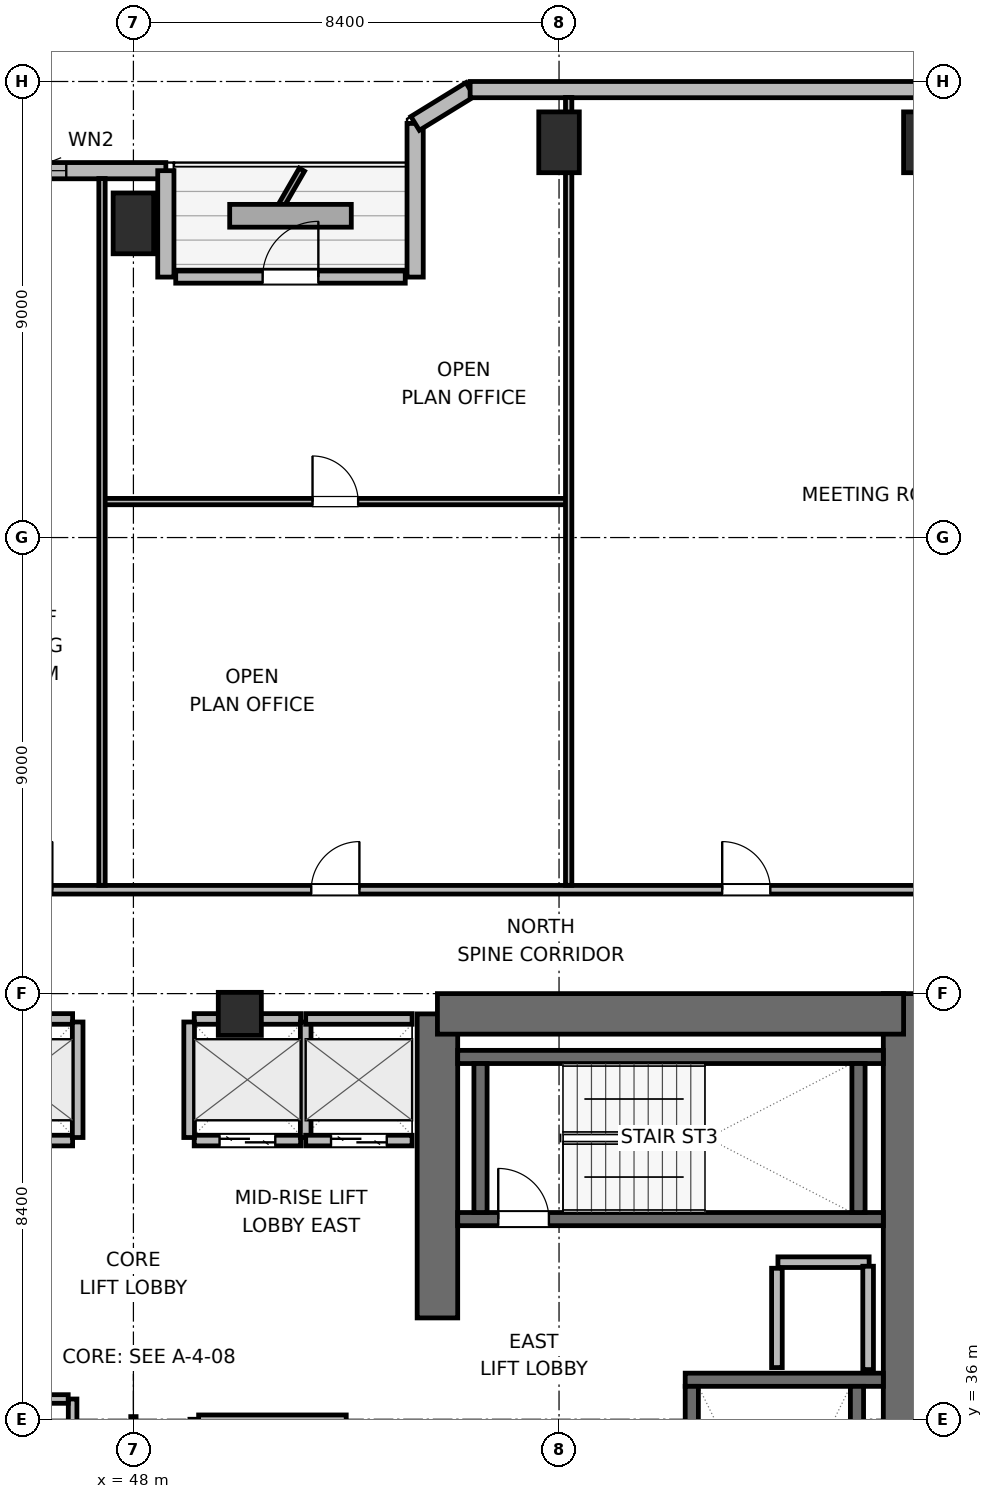
"""IFC4 building model, lengths in metres.
Left out: names, types, materials, properties, quantities, classifications, styles, units other than length and angle.
Written with IfcOpenShell. Run it as: python <this file> out.ifc"""

import sys

from ifc_helpers import new_model, si_unit, direction, frame, frame_2d, origin, origin_2d, place, context, subcontext, project, spatial, rectangle, extrude, element, fill, save


model = new_model("IFC4")
c1 = context("Model", 3, precision=1e-05, world=origin(), true_north=direction((0.0, 1.0)))
c2 = subcontext(c1, "Body", "Model", "MODEL_VIEW")
j1 = project(units=[si_unit("LENGTHUNIT", "METRE"), si_unit("PLANEANGLEUNIT", "RADIAN")], contexts=[c1])
p1 = place(None, origin())
s1 = spatial("IfcSite", under=j1, at=p1, CompositionType="ELEMENT")
p2 = place(p1, origin())
s2 = spatial("IfcBuilding", under=s1, at=p2, CompositionType="ELEMENT")
p3 = place(p2, frame((0.0, 0.0, 133.8)))
s3 = spatial("IfcBuildingStorey", under=s2, at=p3, CompositionType="ELEMENT", Elevation=133.8)
p4 = place(p3, frame((54.0, 38.0, 0.0), z_axis=(0.0, 0.0, 1.0), x_axis=(0.0, 1.0, 0.0)))
e1 = element("IfcWall", 1, at=p4, inside=s3, PredefinedType="SHEAR", context=c2, shape_type="SweptSolid", body=[
    extrude(rectangle(XDim=6.0, YDim=0.8, at=frame_2d((3.0, 0.0))), origin(), (0.0, 0.0, 1.0), 3.9),
])
p5 = place(p3, frame((63.2, 27.6, 0.0), z_axis=(0.0, 0.0, 1.0), x_axis=(0.0, 1.0, 0.0)))
e2 = element("IfcWall", 2, at=p5, inside=s3, PredefinedType="SHEAR", context=c2, shape_type="SweptSolid", body=[
    extrude(rectangle(XDim=16.8, YDim=0.8, at=frame_2d((8.4, 0.0))), origin(), (0.0, 0.0, 1.0), 3.9),
])
p6 = place(p3, frame((54.0, 44.0, 0.0), z_axis=(0.0, 0.0, 1.0), x_axis=(1.0, 0.0, 0.0)))
e3 = element("IfcWall", 3, at=p6, inside=s3, PredefinedType="SHEAR", context=c2, shape_type="SweptSolid", body=[
    extrude(rectangle(XDim=9.2, YDim=0.8, at=frame_2d((4.6, 0.0))), origin(), (0.0, 0.0, 1.0), 3.9),
])
p7 = place(p3, frame((58.89, 36.78, 0.0), z_axis=(0.0, 0.0, 1.0), x_axis=(1.0, 0.0, 0.0)))
e4 = element("IfcWall", 4, at=p7, inside=s3, PredefinedType="SHEAR", context=c2, shape_type="SweptSolid", body=[
    extrude(rectangle(XDim=3.91, YDim=0.26, at=frame_2d((1.955, 0.0))), origin(), (0.0, 0.0, 1.0), 3.9),
])
p8 = place(p3, frame((59.02, 29.05, 0.0), z_axis=(0.0, 0.0, 1.0), x_axis=(0.0, 1.0, 0.0)))
e5 = element("IfcWall", 5, at=p8, inside=s3, PredefinedType="SHEAR", context=c2, shape_type="SweptSolid", body=[
    extrude(rectangle(XDim=7.6, YDim=0.26, at=frame_2d((3.8, 0.0))), origin(), (0.0, 0.0, 1.0), 3.9),
])
p9 = place(p8, frame((0.3, 0.0, 0.0)))
e6 = element("IfcOpeningElement", 6, at=p9, cuts=e5, PredefinedType="OPENING", context=c2, shape_type="SweptSolid", body=[
    extrude(rectangle(XDim=1.0, YDim=2.04, at=frame_2d((0.5, 1.02))), frame((0.0, 0.14, 0.0), z_axis=(0.0, -1.0, 0.0), x_axis=(1.0, 0.0, 0.0)), (0.0, 0.0, 1.0), 0.28),
])
p10 = place(p3, frame((62.28, 29.05, 0.0), z_axis=(0.0, 0.0, 1.0), x_axis=(0.0, 1.0, 0.0)))
e7 = element("IfcWall", 7, at=p10, inside=s3, PredefinedType="SHEAR", context=c2, shape_type="SweptSolid", body=[
    extrude(rectangle(XDim=7.6, YDim=0.26, at=frame_2d((3.8, 0.0))), origin(), (0.0, 0.0, 1.0), 3.9),
])
p11 = place(p3, frame((54.4, 39.95, 0.0), z_axis=(0.0, 0.0, 1.0), x_axis=(1.0, 0.0, 0.0)))
e8 = element("IfcWall", 8, at=p11, inside=s3, PredefinedType="SHEAR", context=c2, shape_type="SweptSolid", body=[
    extrude(rectangle(XDim=8.4, YDim=0.26, at=frame_2d((4.2, 0.0))), origin(), (0.0, 0.0, 1.0), 3.9),
])
p12 = place(p11, frame((0.8, 0.0, 0.0)))
e9 = element("IfcOpeningElement", 9, at=p12, cuts=e8, PredefinedType="OPENING", context=c2, shape_type="SweptSolid", body=[
    extrude(rectangle(XDim=1.0, YDim=2.04, at=frame_2d((0.5, 1.02))), frame((0.0, 0.14, 0.0), z_axis=(0.0, -1.0, 0.0), x_axis=(1.0, 0.0, 0.0)), (0.0, 0.0, 1.0), 0.28),
])
p13 = place(p3, frame((54.4, 43.15, 0.0), z_axis=(0.0, 0.0, 1.0), x_axis=(1.0, 0.0, 0.0)))
e10 = element("IfcWall", 10, at=p13, inside=s3, PredefinedType="SHEAR", context=c2, shape_type="SweptSolid", body=[
    extrude(rectangle(XDim=8.4, YDim=0.26, at=frame_2d((4.2, 0.0))), origin(), (0.0, 0.0, 1.0), 3.9),
])
for number, where, z_axis, x_axis in (
    (11, (54.85, 40.08, 0.0), (0.0, 0.0, 1.0), (0.0, 1.0, 0.0)),
    (12, (62.31, 40.08, 0.0), (0.0, 0.0, 1.0), (0.0, 1.0, 0.0)),
):
    element("IfcWall", number, at=place(p3, frame(where, z_axis=z_axis, x_axis=x_axis)), inside=s3, PredefinedType="SHEAR", context=c2, shape_type="SweptSolid", body=[
        extrude(rectangle(XDim=2.94, YDim=0.26, at=frame_2d((1.47, 0.0))), origin(), (0.0, 0.0, 1.0), 3.9),
    ])
for number, where, z_axis, x_axis in (
    (13, (48.0, 59.6, 0.0), (0.0, 0.0, 1.0), (1.0, 0.0, 0.0)),
    (14, (56.4, 61.2, 0.0), (0.0, 0.0, 1.0), (1.0, 0.0, 0.0)),
    (15, (63.6, 61.2, 0.0), (0.0, 0.0, 1.0), (1.0, 0.0, 0.0)),
):
    element("IfcColumn", number, at=place(p3, frame(where, z_axis=z_axis, x_axis=x_axis)), inside=s3, PredefinedType="COLUMN", context=c2, shape_type="SweptSolid", body=[
        extrude(rectangle(XDim=0.8, YDim=1.2, at=origin_2d()), origin(), (0.0, 0.0, 1.0), 3.9),
    ])
p14 = place(p3, frame((50.1, 44.0, 0.0), z_axis=(0.0, 0.0, 1.0), x_axis=(1.0, 0.0, 0.0)))
e16 = element("IfcColumn", 16, at=p14, inside=s3, PredefinedType="COLUMN", context=c2, shape_type="SweptSolid", body=[
    extrude(rectangle(XDim=0.85, YDim=0.85, at=origin_2d()), origin(), (0.0, 0.0, 1.0), 3.9),
])
p15 = place(p3, frame((43.955, 60.64, 0.0), z_axis=(0.0, 0.0, 1.0), x_axis=(1.0, 0.0, 0.0)))
e17 = element("IfcWall", 17, at=p15, inside=s3, PredefinedType="SOLIDWALL", context=c2, shape_type="SweptSolid", body=[
    extrude(rectangle(XDim=4.685, YDim=0.32, at=frame_2d((2.343, 0.0))), origin(), (0.0, 0.0, 1.0), 2.875),
])
p16 = place(p15, frame((1.22, 0.0, 0.85)))
e18 = element("IfcOpeningElement", 18, at=p16, cuts=e17, PredefinedType="OPENING", context=c2, shape_type="SweptSolid", body=[
    extrude(rectangle(XDim=1.5, YDim=1.1, at=frame_2d((0.75, 0.55))), frame((0.0, 0.17, 0.0), z_axis=(0.0, -1.0, 0.0), x_axis=(1.0, 0.0, 0.0)), (0.0, 0.0, 1.0), 0.34),
])
p17 = place(p3, frame((48.64, 60.64, 0.0), z_axis=(0.0, 0.0, 1.0), x_axis=(0.0, -1.0, 0.0)))
e19 = element("IfcWall", 19, at=p17, inside=s3, PredefinedType="SOLIDWALL", context=c2, shape_type="SweptSolid", body=[
    extrude(rectangle(XDim=2.1, YDim=0.32, at=frame_2d((1.05, 0.0))), origin(), (0.0, 0.0, 1.0), 2.875),
])
p18 = place(p3, frame((48.835, 58.54, 0.0), z_axis=(0.0, 0.0, 1.0), x_axis=(1.0, 0.0, 0.0)))
e20 = element("IfcWall", 20, at=p18, inside=s3, PredefinedType="SOLIDWALL", context=c2, shape_type="SweptSolid", body=[
    extrude(rectangle(XDim=4.53, YDim=0.24, at=frame_2d((2.265, 0.0))), origin(), (0.0, 0.0, 1.0), 3.64),
])
p19 = place(p18, frame((1.715, 0.0, 0.0)))
e21 = element("IfcOpeningElement", 21, at=p19, cuts=e20, PredefinedType="OPENING", context=c2, shape_type="SweptSolid", body=[
    extrude(rectangle(XDim=1.1, YDim=2.04, at=frame_2d((0.55, 1.02))), frame((0.0, 0.13, 0.0), z_axis=(0.0, -1.0, 0.0), x_axis=(1.0, 0.0, 0.0)), (0.0, 0.0, 1.0), 0.26),
])
p20 = place(p3, frame((53.56, 58.54, 0.0), z_axis=(0.0, 0.0, 1.0), x_axis=(0.0, 1.0, 0.0)))
e22 = element("IfcWall", 22, at=p20, inside=s3, PredefinedType="SOLIDWALL", context=c2, shape_type="SweptSolid", body=[
    extrude(rectangle(XDim=3.032, YDim=0.32, at=frame_2d((1.516, 0.0))), origin(), (0.0, 0.0, 1.0), 2.875),
])
p21 = place(p3, frame((53.56, 61.573, 0.0), z_axis=(0.0, 0.0, 1.0), x_axis=(0.851776724646, 0.523904964045, 0.0)))
e23 = element("IfcWall", 23, at=p21, inside=s3, PredefinedType="SOLIDWALL", context=c2, shape_type="SweptSolid", body=[
    extrude(rectangle(XDim=1.274, YDim=0.32, at=frame_2d((0.637, 0.0))), origin(), (0.0, 0.0, 1.0), 3.64),
])
p22 = place(p3, frame((54.645, 62.24, 0.0), z_axis=(0.0, 0.0, 1.0), x_axis=(1.0, 0.0, 0.0)))
e24 = element("IfcWall", 24, at=p22, inside=s3, PredefinedType="SOLIDWALL", context=c2, shape_type="SweptSolid", body=[
    extrude(rectangle(XDim=10.734, YDim=0.32, at=frame_2d((5.367, 0.0))), origin(), (0.0, 0.0, 1.0), 3.64),
])
p23 = place(p3, frame((60.72, 39.1, 0.0), z_axis=(0.0, 0.0, 1.0), x_axis=(1.0, 0.0, 0.0)))
e25 = element("IfcWall", 25, at=p23, inside=s3, PredefinedType="PARTITIONING", context=c2, shape_type="SweptSolid", body=[
    extrude(rectangle(XDim=1.8, YDim=0.21, at=frame_2d((0.9, 0.0))), origin(), (0.0, 0.0, 1.0), 3.64),
])
p24 = place(p3, frame((60.7, 37.02, 0.0), z_axis=(0.0, 0.0, 1.0), x_axis=(0.0, 1.0, 0.0)))
e26 = element("IfcWall", 26, at=p24, inside=s3, PredefinedType="PARTITIONING", context=c2, shape_type="SweptSolid", body=[
    extrude(rectangle(XDim=1.96, YDim=0.21, at=frame_2d((0.98, 0.0))), origin(), (0.0, 0.0, 1.0), 3.64),
])
p25 = place(p3, frame((62.5, 36.98, 0.0), z_axis=(0.0, 0.0, 1.0), x_axis=(0.0, 1.0, 0.0)))
e27 = element("IfcWall", 27, at=p25, inside=s3, PredefinedType="PARTITIONING", context=c2, shape_type="SweptSolid", body=[
    extrude(rectangle(XDim=2.04, YDim=0.21, at=frame_2d((1.02, 0.0))), origin(), (0.0, 0.0, 1.0), 3.64),
])
p26 = place(p3, frame((44.7, 41.5, 0.0), z_axis=(0.0, 0.0, 1.0), x_axis=(1.0, 0.0, 0.0)))
e28 = element("IfcWall", 28, at=p26, inside=s3, PredefinedType="PARTITIONING", context=c2, shape_type="SweptSolid", body=[
    extrude(rectangle(XDim=2.1, YDim=0.21, at=frame_2d((1.05, 0.0))), origin(), (0.0, 0.0, 1.0), 3.64),
])
p27 = place(p26, frame((0.5, 0.0, 0.0)))
e29 = element("IfcOpeningElement", 29, at=p27, cuts=e28, PredefinedType="OPENING", context=c2, shape_type="SweptSolid", body=[
    extrude(rectangle(XDim=1.1, YDim=2.04, at=frame_2d((0.55, 1.02))), frame((0.0, 0.115, 0.0), z_axis=(0.0, -1.0, 0.0), x_axis=(1.0, 0.0, 0.0)), (0.0, 0.0, 1.0), 0.23),
])
p28 = place(p3, frame((44.7, 43.9, 0.0), z_axis=(0.0, 0.0, 1.0), x_axis=(1.0, 0.0, 0.0)))
e30 = element("IfcWall", 30, at=p28, inside=s3, PredefinedType="PARTITIONING", context=c2, shape_type="SweptSolid", body=[
    extrude(rectangle(XDim=2.1, YDim=0.21, at=frame_2d((1.05, 0.0))), origin(), (0.0, 0.0, 1.0), 2.525),
])
p29 = place(p3, frame((46.9, 41.56, 0.0), z_axis=(0.0, 0.0, 1.0), x_axis=(0.0, 1.0, 0.0)))
e31 = element("IfcWall", 31, at=p29, inside=s3, PredefinedType="PARTITIONING", context=c2, shape_type="SweptSolid", body=[
    extrude(rectangle(XDim=2.28, YDim=0.21, at=frame_2d((1.14, 0.0))), origin(), (0.0, 0.0, 1.0), 3.64),
])
p30 = place(p3, frame((49.2, 41.5, 0.0), z_axis=(0.0, 0.0, 1.0), x_axis=(1.0, 0.0, 0.0)))
e32 = element("IfcWall", 32, at=p30, inside=s3, PredefinedType="PARTITIONING", context=c2, shape_type="SweptSolid", body=[
    extrude(rectangle(XDim=2.1, YDim=0.21, at=frame_2d((1.05, 0.0))), origin(), (0.0, 0.0, 1.0), 3.64),
])
p31 = place(p30, frame((0.5, 0.0, 0.0)))
e33 = element("IfcOpeningElement", 33, at=p31, cuts=e32, PredefinedType="OPENING", context=c2, shape_type="SweptSolid", body=[
    extrude(rectangle(XDim=1.1, YDim=2.04, at=frame_2d((0.55, 1.02))), frame((0.0, 0.115, 0.0), z_axis=(0.0, -1.0, 0.0), x_axis=(1.0, 0.0, 0.0)), (0.0, 0.0, 1.0), 0.23),
])
p32 = place(p3, frame((49.2, 43.9, 0.0), z_axis=(0.0, 0.0, 1.0), x_axis=(1.0, 0.0, 0.0)))
e34 = element("IfcWall", 34, at=p32, inside=s3, PredefinedType="PARTITIONING", context=c2, shape_type="SweptSolid", body=[
    extrude(rectangle(XDim=2.1, YDim=0.21, at=frame_2d((1.05, 0.0))), origin(), (0.0, 0.0, 1.0), 2.525),
])
for number, where, z_axis, x_axis in (
    (35, (49.1, 41.56, 0.0), (0.0, 0.0, 1.0), (0.0, 1.0, 0.0)),
    (36, (51.4, 41.56, 0.0), (0.0, 0.0, 1.0), (0.0, 1.0, 0.0)),
):
    element("IfcWall", number, at=place(p3, frame(where, z_axis=z_axis, x_axis=x_axis)), inside=s3, PredefinedType="PARTITIONING", context=c2, shape_type="SweptSolid", body=[
        extrude(rectangle(XDim=2.28, YDim=0.21, at=frame_2d((1.14, 0.0))), origin(), (0.0, 0.0, 1.0), 3.64),
    ])
p33 = place(p3, frame((51.4, 41.5, 0.0), z_axis=(0.0, 0.0, 1.0), x_axis=(1.0, 0.0, 0.0)))
e37 = element("IfcWall", 37, at=p33, inside=s3, PredefinedType="PARTITIONING", context=c2, shape_type="SweptSolid", body=[
    extrude(rectangle(XDim=2.1, YDim=0.21, at=frame_2d((1.05, 0.0))), origin(), (0.0, 0.0, 1.0), 3.64),
])
p34 = place(p33, frame((0.5, 0.0, 0.0)))
e38 = element("IfcOpeningElement", 38, at=p34, cuts=e37, PredefinedType="OPENING", context=c2, shape_type="SweptSolid", body=[
    extrude(rectangle(XDim=1.1, YDim=2.04, at=frame_2d((0.55, 1.02))), frame((0.0, 0.115, 0.0), z_axis=(0.0, -1.0, 0.0), x_axis=(1.0, 0.0, 0.0)), (0.0, 0.0, 1.0), 0.23),
])
p35 = place(p3, frame((51.4, 43.9, 0.0), z_axis=(0.0, 0.0, 1.0), x_axis=(1.0, 0.0, 0.0)))
e39 = element("IfcWall", 39, at=p35, inside=s3, PredefinedType="PARTITIONING", context=c2, shape_type="SweptSolid", body=[
    extrude(rectangle(XDim=2.1, YDim=0.21, at=frame_2d((1.05, 0.0))), origin(), (0.0, 0.0, 1.0), 2.525),
])
p36 = place(p3, frame((46.8, 32.6, 0.0), z_axis=(0.0, 0.0, 1.0), x_axis=(0.0, 1.0, 0.0)))
e40 = element("IfcWall", 40, at=p36, inside=s3, PredefinedType="PARTITIONING", context=c2, shape_type="SweptSolid", body=[
    extrude(rectangle(XDim=3.8, YDim=0.17, at=frame_2d((1.9, 0.0))), origin(), (0.0, 0.0, 1.0), 3.64),
])
p37 = place(p36, frame((0.5, 0.0, 0.0)))
e41 = element("IfcOpeningElement", 41, at=p37, cuts=e40, PredefinedType="OPENING", context=c2, shape_type="SweptSolid", body=[
    extrude(rectangle(XDim=0.9, YDim=2.02, at=frame_2d((0.45, 1.01))), frame((0.0, 0.095, 0.0), z_axis=(0.0, -1.0, 0.0), x_axis=(1.0, 0.0, 0.0)), (0.0, 0.0, 1.0), 0.19),
])
p38 = place(p36, frame((2.4, 0.0, 0.0)))
e42 = element("IfcOpeningElement", 42, at=p38, cuts=e40, PredefinedType="OPENING", context=c2, shape_type="SweptSolid", body=[
    extrude(rectangle(XDim=0.9, YDim=2.02, at=frame_2d((0.45, 1.01))), frame((0.0, 0.095, 0.0), z_axis=(0.0, -1.0, 0.0), x_axis=(1.0, 0.0, 0.0)), (0.0, 0.0, 1.0), 0.19),
])
for number, where, z_axis, x_axis in (
    (43, (43.8, 36.4, 0.0), (0.0, 0.0, 1.0), (1.0, 0.0, 0.0)),
    (44, (49.287, 36.0, 0.0), (0.0, 0.0, 1.0), (1.0, 0.0, 0.0)),
):
    element("IfcWall", number, at=place(p3, frame(where, z_axis=z_axis, x_axis=x_axis)), inside=s3, PredefinedType="PARTITIONING", context=c2, shape_type="SweptSolid", body=[
        extrude(rectangle(XDim=2.913, YDim=0.17, at=frame_2d((1.457, 0.0))), origin(), (0.0, 0.0, 1.0), 3.64),
    ])
p39 = place(p3, frame((30.35, 46.45, 0.0), z_axis=(0.0, 0.0, 1.0), x_axis=(1.0, 0.0, 0.0)))
e45 = element("IfcWall", 45, at=p39, inside=s3, PredefinedType="PARTITIONING", context=c2, shape_type="SweptSolid", body=[
    extrude(rectangle(XDim=33.25, YDim=0.17, at=frame_2d((16.625, 0.0))), origin(), (0.0, 0.0, 1.0), 3.64),
])
p40 = place(p39, frame((3.03, 0.0, 0.0)))
e46 = element("IfcOpeningElement", 46, at=p40, cuts=e45, PredefinedType="OPENING", context=c2, shape_type="SweptSolid", body=[
    extrude(rectangle(XDim=0.95, YDim=2.04, at=frame_2d((0.475, 1.02))), frame((0.0, 0.095, 0.0), z_axis=(0.0, -1.0, 0.0), x_axis=(1.0, 0.0, 0.0)), (0.0, 0.0, 1.0), 0.19),
])
p41 = place(p39, frame((10.09, 0.0, 0.0)))
e47 = element("IfcOpeningElement", 47, at=p41, cuts=e45, PredefinedType="OPENING", context=c2, shape_type="SweptSolid", body=[
    extrude(rectangle(XDim=0.95, YDim=2.04, at=frame_2d((0.475, 1.02))), frame((0.0, 0.095, 0.0), z_axis=(0.0, -1.0, 0.0), x_axis=(1.0, 0.0, 0.0)), (0.0, 0.0, 1.0), 0.19),
])
p42 = place(p39, frame((15.1, 0.0, 0.0)))
e48 = element("IfcOpeningElement", 48, at=p42, cuts=e45, PredefinedType="OPENING", context=c2, shape_type="SweptSolid", body=[
    extrude(rectangle(XDim=0.95, YDim=2.04, at=frame_2d((0.475, 1.02))), frame((0.0, 0.095, 0.0), z_axis=(0.0, -1.0, 0.0), x_axis=(1.0, 0.0, 0.0)), (0.0, 0.0, 1.0), 0.19),
])
p43 = place(p39, frame((21.16, 0.0, 0.0)))
e49 = element("IfcOpeningElement", 49, at=p43, cuts=e45, PredefinedType="OPENING", context=c2, shape_type="SweptSolid", body=[
    extrude(rectangle(XDim=0.95, YDim=2.04, at=frame_2d((0.475, 1.02))), frame((0.0, 0.095, 0.0), z_axis=(0.0, -1.0, 0.0), x_axis=(1.0, 0.0, 0.0)), (0.0, 0.0, 1.0), 0.19),
])
p44 = place(p39, frame((29.27, 0.0, 0.0)))
e50 = element("IfcOpeningElement", 50, at=p44, cuts=e45, PredefinedType="OPENING", context=c2, shape_type="SweptSolid", body=[
    extrude(rectangle(XDim=0.95, YDim=2.04, at=frame_2d((0.475, 1.02))), frame((0.0, 0.095, 0.0), z_axis=(0.0, -1.0, 0.0), x_axis=(1.0, 0.0, 0.0)), (0.0, 0.0, 1.0), 0.19),
])
p45 = place(p3, frame((47.38, 54.11, 0.0), z_axis=(0.0, 0.0, 1.0), x_axis=(1.0, 0.0, 0.0)))
e51 = element("IfcWall", 51, at=p45, inside=s3, PredefinedType="PARTITIONING", context=c2, shape_type="SweptSolid", body=[
    extrude(rectangle(XDim=9.21, YDim=0.125, at=frame_2d((4.605, 0.0))), origin(), (0.0, 0.0, 1.0), 3.64),
])
p46 = place(p45, frame((4.155, 0.0, 0.0)))
e52 = element("IfcOpeningElement", 52, at=p46, cuts=e51, PredefinedType="OPENING", context=c2, shape_type="SweptSolid", body=[
    extrude(rectangle(XDim=0.9, YDim=2.02, at=frame_2d((0.45, 1.01))), frame((0.0, 0.073, 0.0), z_axis=(0.0, -1.0, 0.0), x_axis=(1.0, 0.0, 0.0)), (0.0, 0.0, 1.0), 0.145),
])
p47 = place(p3, frame((47.38, 46.537, 0.0), z_axis=(0.0, 0.0, 1.0), x_axis=(0.0, 1.0, 0.0)))
e53 = element("IfcWall", 53, at=p47, inside=s3, PredefinedType="PARTITIONING", context=c2, shape_type="SweptSolid", body=[
    extrude(rectangle(XDim=13.948, YDim=0.125, at=frame_2d((6.974, 0.0))), origin(), (0.0, 0.0, 1.0), 3.64),
])
p48 = place(p3, frame((56.59, 46.537, 0.0), z_axis=(0.0, 0.0, 1.0), x_axis=(0.0, 1.0, 0.0)))
e54 = element("IfcWall", 54, at=p48, inside=s3, PredefinedType="PARTITIONING", context=c2, shape_type="SweptSolid", body=[
    extrude(rectangle(XDim=15.548, YDim=0.125, at=frame_2d((7.774, 0.0))), origin(), (0.0, 0.0, 1.0), 3.003),
])
p49 = place(p16, origin())
e55 = element("IfcWindow", 55, at=p49, inside=s3, PartitioningType="SINGLE_PANEL", PredefinedType="WINDOW", context=c2, shape_type="SweptSolid", body=[
    extrude(rectangle(XDim=1.5, YDim=1.1, at=frame_2d((0.75, 0.55))), frame((0.0, 0.03, 0.0), z_axis=(0.0, -1.0, 0.0), x_axis=(1.0, 0.0, 0.0)), (0.0, 0.0, 1.0), 0.06),
])
fill(e18, e55)
p50 = place(p19, origin())
e56 = element("IfcDoor", 56, at=p50, inside=s3, OperationType="SINGLE_SWING_RIGHT", PredefinedType="DOOR", context=c2, shape_type="SweptSolid", body=[
    extrude(rectangle(XDim=1.1, YDim=2.04, at=frame_2d((0.55, 1.02))), frame((0.0, 0.025, 0.0), z_axis=(0.0, -1.0, 0.0), x_axis=(1.0, 0.0, 0.0)), (0.0, 0.0, 1.0), 0.05),
])
fill(e21, e56)
p51 = place(p12, origin())
e57 = element("IfcDoor", 57, at=p51, inside=s3, OperationType="SINGLE_SWING_LEFT", PredefinedType="DOOR", context=c2, shape_type="SweptSolid", body=[
    extrude(rectangle(XDim=1.0, YDim=2.04, at=frame_2d((0.5, 1.02))), frame((0.0, 0.025, 0.0), z_axis=(0.0, -1.0, 0.0), x_axis=(1.0, 0.0, 0.0)), (0.0, 0.0, 1.0), 0.05),
])
fill(e9, e57)
p52 = place(p31, origin())
e58 = element("IfcDoor", 58, at=p52, inside=s3, OperationType="DOUBLE_DOOR_SLIDING", PredefinedType="DOOR", context=c2, shape_type="SweptSolid", body=[
    extrude(rectangle(XDim=1.1, YDim=2.04, at=frame_2d((0.55, 1.02))), frame((0.0, 0.025, 0.0), z_axis=(0.0, -1.0, 0.0), x_axis=(1.0, 0.0, 0.0)), (0.0, 0.0, 1.0), 0.05),
])
fill(e33, e58)
p53 = place(p34, origin())
e59 = element("IfcDoor", 59, at=p53, inside=s3, OperationType="DOUBLE_DOOR_SLIDING", PredefinedType="DOOR", context=c2, shape_type="SweptSolid", body=[
    extrude(rectangle(XDim=1.1, YDim=2.04, at=frame_2d((0.55, 1.02))), frame((0.0, 0.025, 0.0), z_axis=(0.0, -1.0, 0.0), x_axis=(1.0, 0.0, 0.0)), (0.0, 0.0, 1.0), 0.05),
])
fill(e38, e59)
p54 = place(p42, origin())
e60 = element("IfcDoor", 60, at=p54, inside=s3, OperationType="SINGLE_SWING_RIGHT", PredefinedType="DOOR", context=c2, shape_type="SweptSolid", body=[
    extrude(rectangle(XDim=0.95, YDim=2.04, at=frame_2d((0.475, 1.02))), frame((0.0, 0.025, 0.0), z_axis=(0.0, -1.0, 0.0), x_axis=(1.0, 0.0, 0.0)), (0.0, 0.0, 1.0), 0.05),
])
fill(e48, e60)
p55 = place(p46, origin())
e61 = element("IfcDoor", 61, at=p55, inside=s3, OperationType="SINGLE_SWING_LEFT", PredefinedType="DOOR", context=c2, shape_type="SweptSolid", body=[
    extrude(rectangle(XDim=0.9, YDim=2.02, at=frame_2d((0.45, 1.01))), frame((0.0, 0.025, 0.0), z_axis=(0.0, -1.0, 0.0), x_axis=(1.0, 0.0, 0.0)), (0.0, 0.0, 1.0), 0.05),
])
fill(e52, e61)
p56 = place(p43, origin())
e62 = element("IfcDoor", 62, at=p56, inside=s3, OperationType="SINGLE_SWING_RIGHT", PredefinedType="DOOR", context=c2, shape_type="SweptSolid", body=[
    extrude(rectangle(XDim=0.95, YDim=2.04, at=frame_2d((0.475, 1.02))), frame((0.0, 0.025, 0.0), z_axis=(0.0, -1.0, 0.0), x_axis=(1.0, 0.0, 0.0)), (0.0, 0.0, 1.0), 0.05),
])
fill(e49, e62)
p57 = place(p44, origin())
e63 = element("IfcDoor", 63, at=p57, inside=s3, OperationType="SINGLE_SWING_LEFT", PredefinedType="DOOR", context=c2, shape_type="SweptSolid", body=[
    extrude(rectangle(XDim=0.95, YDim=2.04, at=frame_2d((0.475, 1.02))), frame((0.0, 0.025, 0.0), z_axis=(0.0, -1.0, 0.0), x_axis=(1.0, 0.0, 0.0)), (0.0, 0.0, 1.0), 0.05),
])
fill(e50, e63)
save(model, sys.argv[1])
